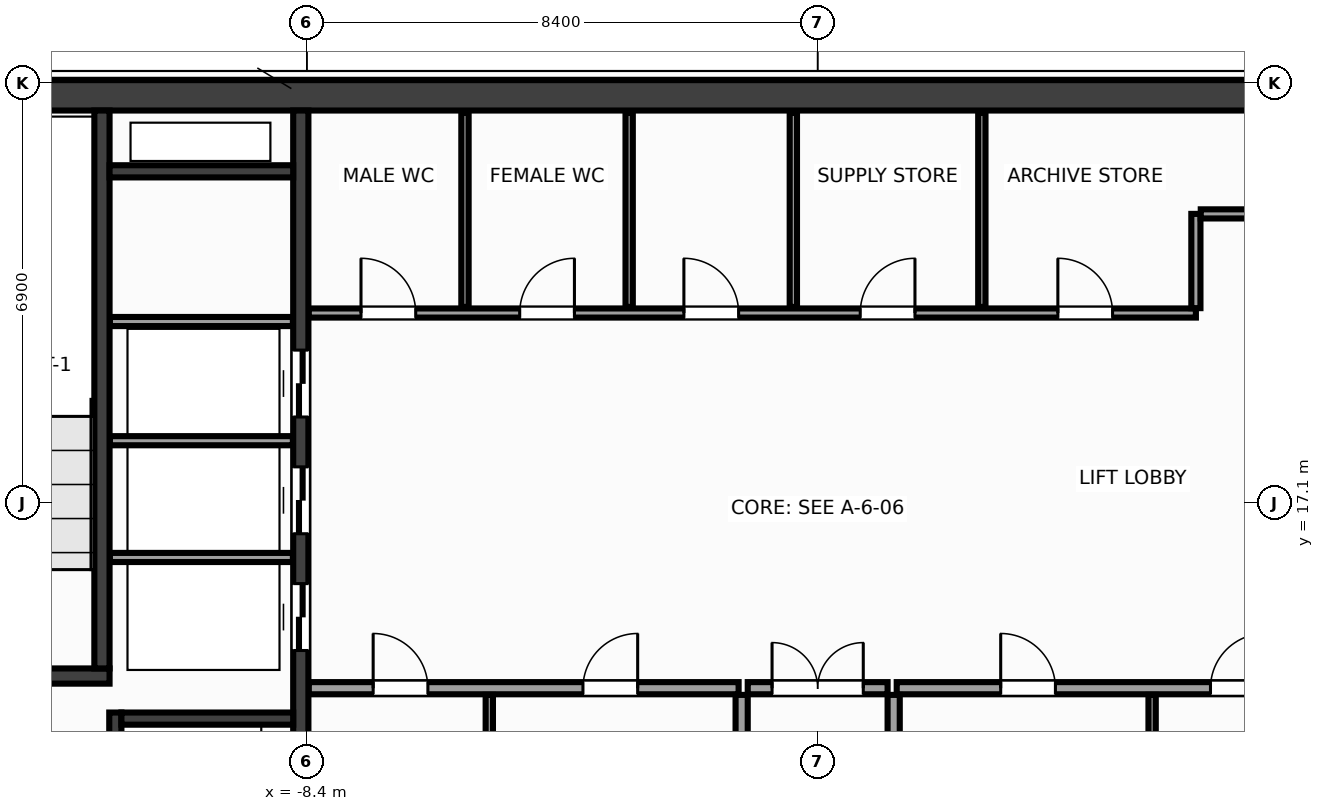
"""IFC4 building model, lengths in metres.
Left out: names, types, materials, properties, quantities, classifications, styles, units other than length and angle.
Written with IfcOpenShell. Run it as: python <this file> out.ifc"""

import sys

from ifc_helpers import new_model, si_unit, direction, frame, frame_2d, origin, place, context, subcontext, project, spatial, rectangle, extrude, source, transform, mapped, element, fill, save


model = new_model("IFC4")
c1 = context("Model", 3, precision=1e-05, world=origin(), true_north=direction((0.0, 1.0)))
c2 = subcontext(c1, "Body", "Model", "MODEL_VIEW")
j1 = project(units=[si_unit("LENGTHUNIT", "METRE"), si_unit("PLANEANGLEUNIT", "RADIAN")], contexts=[c1])
p1 = place(None, origin())
s1 = spatial("IfcSite", under=j1, at=p1, CompositionType="ELEMENT")
p2 = place(p1, origin())
s2 = spatial("IfcBuilding", under=s1, at=p2, CompositionType="ELEMENT")
p3 = place(p2, frame((0.0, 0.0, 257.6)))
s3 = spatial("IfcBuildingStorey", under=s2, at=p3, CompositionType="ELEMENT", Elevation=257.6)
m1 = source(origin(), c2, "Body", "SweptSolid", [
    extrude(rectangle(XDim=31.7, YDim=0.5, at=frame_2d((15.85, 0.0))), origin(), (0.0, 0.0, 1.0), 3.6),
])
p4 = place(p3, frame((-15.85, 23.8, 0.0), z_axis=(0.0, 0.0, 1.0), x_axis=(1.0, 0.0, 0.0)))
e1 = element("IfcWall", 1, at=p4, inside=s3, PredefinedType="SHEAR", context=c2, shape_type="MappedRepresentation", body=[
    mapped(m1, transform((0.0, 0.0, 0.0), x_axis=(1.0, 0.0, 0.0), y_axis=(0.0, 1.0, 0.0), z_axis=(0.0, 0.0, 1.0), scale=1.0)),
])
m2 = source(origin(), c2, "Body", "SweptSolid", [
    extrude(rectangle(XDim=13.1, YDim=0.25, at=frame_2d((6.55, 0.0))), origin(), (0.0, 0.0, 1.0), 3.6),
])
p5 = place(p3, frame((-8.5, 10.45, 0.0), z_axis=(0.0, 0.0, 1.0), x_axis=(0.0, 1.0, 0.0)))
e2 = element("IfcWall", 2, at=p5, inside=s3, PredefinedType="SHEAR", context=c2, shape_type="MappedRepresentation", body=[
    mapped(m2, transform((0.0, 0.0, 0.0), x_axis=(1.0, 0.0, 0.0), y_axis=(0.0, 1.0, 0.0), z_axis=(0.0, 0.0, 1.0), scale=1.0)),
])
p6 = place(p5, frame((4.22, 0.0, 0.0)))
e3 = element("IfcOpeningElement", 3, at=p6, cuts=e2, PredefinedType="OPENING", context=c2, shape_type="SweptSolid", body=[
    extrude(rectangle(XDim=1.1, YDim=2.15, at=frame_2d((0.55, 1.075))), frame((0.0, 0.137, 0.0), z_axis=(0.0, -1.0, 0.0), x_axis=(1.0, 0.0, 0.0)), (0.0, 0.0, 1.0), 0.274),
])
p7 = place(p5, frame((6.14, 0.0, 0.0)))
e4 = element("IfcOpeningElement", 4, at=p7, cuts=e2, PredefinedType="OPENING", context=c2, shape_type="SweptSolid", body=[
    extrude(rectangle(XDim=1.1, YDim=2.15, at=frame_2d((0.55, 1.075))), frame((0.0, 0.137, 0.0), z_axis=(0.0, -1.0, 0.0), x_axis=(1.0, 0.0, 0.0)), (0.0, 0.0, 1.0), 0.274),
])
p8 = place(p5, frame((8.06, 0.0, 0.0)))
e5 = element("IfcOpeningElement", 5, at=p8, cuts=e2, PredefinedType="OPENING", context=c2, shape_type="SweptSolid", body=[
    extrude(rectangle(XDim=1.1, YDim=2.15, at=frame_2d((0.55, 1.075))), frame((0.0, 0.137, 0.0), z_axis=(0.0, -1.0, 0.0), x_axis=(1.0, 0.0, 0.0)), (0.0, 0.0, 1.0), 0.274),
])
m3 = source(origin(), c2, "Body", "SweptSolid", [
    extrude(rectangle(XDim=3.705, YDim=0.25, at=frame_2d((1.853, 0.0))), origin(), (0.0, 0.0, 1.0), 3.6),
])
p9 = place(p3, frame((-15.35, 14.25, 0.0), z_axis=(0.0, 0.0, 1.0), x_axis=(1.0, 0.0, 0.0)))
e6 = element("IfcWall", 6, at=p9, inside=s3, PredefinedType="SHEAR", context=c2, shape_type="MappedRepresentation", body=[
    mapped(m3, transform((0.0, 0.0, 0.0), x_axis=(1.0, 0.0, 0.0), y_axis=(0.0, 1.0, 0.0), z_axis=(0.0, 0.0, 1.0), scale=1.0)),
])
p10 = place(p9, frame((0.95, 0.0, 0.0)))
e7 = element("IfcOpeningElement", 7, at=p10, cuts=e6, PredefinedType="OPENING", context=c2, shape_type="SweptSolid", body=[
    extrude(rectangle(XDim=1.6, YDim=2.15, at=frame_2d((0.8, 1.075))), frame((0.0, 0.137, 0.0), z_axis=(0.0, -1.0, 0.0), x_axis=(1.0, 0.0, 0.0)), (0.0, 0.0, 1.0), 0.274),
])
m4 = source(origin(), c2, "Body", "SweptSolid", [
    extrude(rectangle(XDim=9.175, YDim=0.25, at=frame_2d((4.587, 0.0))), origin(), (0.0, 0.0, 1.0), 3.6),
])
p11 = place(p3, frame((-11.77, 14.375, 0.0), z_axis=(0.0, 0.0, 1.0), x_axis=(0.0, 1.0, 0.0)))
e8 = element("IfcWall", 8, at=p11, inside=s3, PredefinedType="SHEAR", context=c2, shape_type="MappedRepresentation", body=[
    mapped(m4, transform((0.0, 0.0, 0.0), x_axis=(1.0, 0.0, 0.0), y_axis=(0.0, 1.0, 0.0), z_axis=(0.0, 0.0, 1.0), scale=1.0)),
])
m5 = source(origin(), c2, "Body", "SweptSolid", [
    extrude(rectangle(XDim=3.2, YDim=0.2, at=frame_2d((1.6, 0.0))), origin(), (0.0, 0.0, 1.0), 3.6),
])
p12 = place(p3, frame((-11.55, 10.45, 0.0), z_axis=(0.0, 0.0, 1.0), x_axis=(0.0, 1.0, 0.0)))
e9 = element("IfcWall", 9, at=p12, inside=s3, PredefinedType="SHEAR", context=c2, shape_type="MappedRepresentation", body=[
    mapped(m5, transform((0.0, 0.0, 0.0), x_axis=(1.0, 0.0, 0.0), y_axis=(0.0, 1.0, 0.0), z_axis=(0.0, 0.0, 1.0), scale=1.0)),
])
p13 = place(p12, frame((0.9, 0.0, 0.0)))
e10 = element("IfcOpeningElement", 10, at=p13, cuts=e9, PredefinedType="OPENING", context=c2, shape_type="SweptSolid", body=[
    extrude(rectangle(XDim=1.1, YDim=2.15, at=frame_2d((0.55, 1.075))), frame((0.0, 0.112, 0.0), z_axis=(0.0, -1.0, 0.0), x_axis=(1.0, 0.0, 0.0)), (0.0, 0.0, 1.0), 0.224),
])
m6 = source(origin(), c2, "Body", "SweptSolid", [
    extrude(rectangle(XDim=2.825, YDim=0.2, at=frame_2d((1.413, 0.0))), origin(), (0.0, 0.0, 1.0), 3.6),
])
p14 = place(p3, frame((-11.45, 13.55, 0.0), z_axis=(0.0, 0.0, 1.0), x_axis=(1.0, 0.0, 0.0)))
e11 = element("IfcWall", 11, at=p14, inside=s3, PredefinedType="SHEAR", context=c2, shape_type="MappedRepresentation", body=[
    mapped(m6, transform((0.0, 0.0, 0.0), x_axis=(1.0, 0.0, 0.0), y_axis=(0.0, 1.0, 0.0), z_axis=(0.0, 0.0, 1.0), scale=1.0)),
])
m7 = source(origin(), c2, "Body", "SweptSolid", [
    extrude(rectangle(XDim=3.02, YDim=0.2, at=frame_2d((1.51, 0.0))), origin(), (0.0, 0.0, 1.0), 3.6),
])
p15 = place(p3, frame((-11.645, 22.55, 0.0), z_axis=(0.0, 0.0, 1.0), x_axis=(1.0, 0.0, 0.0)))
e12 = element("IfcWall", 12, at=p15, inside=s3, PredefinedType="SHEAR", context=c2, shape_type="MappedRepresentation", body=[
    mapped(m7, transform((0.0, 0.0, 0.0), x_axis=(1.0, 0.0, 0.0), y_axis=(0.0, 1.0, 0.0), z_axis=(0.0, 0.0, 1.0), scale=1.0)),
])
m8 = source(origin(), c2, "Body", "SweptSolid", [
    extrude(rectangle(XDim=3.01, YDim=0.15, at=frame_2d((1.505, 0.0))), origin(), (0.0, 0.0, 1.0), 3.37),
])
for number, where, z_axis, x_axis in (
    (13, (-11.64, 16.2, 0.0), (0.0, 0.0, 1.0), (1.0, 0.0, 0.0)),
    (14, (-11.64, 18.12, 0.0), (0.0, 0.0, 1.0), (1.0, 0.0, 0.0)),
    (15, (-11.64, 20.08, 0.0), (0.0, 0.0, 1.0), (1.0, 0.0, 0.0)),
):
    element("IfcWall", number, at=place(p3, frame(where, z_axis=z_axis, x_axis=x_axis)), inside=s3, PredefinedType="PARTITIONING", context=c2, shape_type="MappedRepresentation", body=[
        mapped(m8, transform((0.0, 0.0, 0.0), x_axis=(1.0, 0.0, 0.0), y_axis=(0.0, 1.0, 0.0), z_axis=(0.0, 0.0, 1.0), scale=1.0)),
    ])
m9 = source(origin(), c2, "Body", "SweptSolid", [
    extrude(rectangle(XDim=7.07, YDim=0.2, at=frame_2d((3.535, 0.0))), origin(), (0.0, 0.0, 1.0), 3.37),
])
p16 = place(p3, frame((-8.37, 14.05, 0.0), z_axis=(0.0, 0.0, 1.0), x_axis=(1.0, 0.0, 0.0)))
e16 = element("IfcWall", 16, at=p16, inside=s3, PredefinedType="PARTITIONING", context=c2, shape_type="MappedRepresentation", body=[
    mapped(m9, transform((0.0, 0.0, 0.0), x_axis=(1.0, 0.0, 0.0), y_axis=(0.0, 1.0, 0.0), z_axis=(0.0, 0.0, 1.0), scale=1.0)),
])
p17 = place(p16, frame((1.06, 0.0, 0.0)))
e17 = element("IfcOpeningElement", 17, at=p17, cuts=e16, PredefinedType="OPENING", context=c2, shape_type="SweptSolid", body=[
    extrude(rectangle(XDim=0.9, YDim=2.15, at=frame_2d((0.45, 1.075))), frame((0.0, 0.112, 0.0), z_axis=(0.0, -1.0, 0.0), x_axis=(1.0, 0.0, 0.0)), (0.0, 0.0, 1.0), 0.224),
])
p18 = place(p16, frame((4.51, 0.0, 0.0)))
e18 = element("IfcOpeningElement", 18, at=p18, cuts=e16, PredefinedType="OPENING", context=c2, shape_type="SweptSolid", body=[
    extrude(rectangle(XDim=0.9, YDim=2.15, at=frame_2d((0.45, 1.075))), frame((0.0, 0.112, 0.0), z_axis=(0.0, -1.0, 0.0), x_axis=(1.0, 0.0, 0.0)), (0.0, 0.0, 1.0), 0.224),
])
p19 = place(p3, frame((1.3, 14.05, 0.0), z_axis=(0.0, 0.0, 1.0), x_axis=(1.0, 0.0, 0.0)))
e19 = element("IfcWall", 19, at=p19, inside=s3, PredefinedType="PARTITIONING", context=c2, shape_type="MappedRepresentation", body=[
    mapped(m9, transform((0.0, 0.0, 0.0), x_axis=(1.0, 0.0, 0.0), y_axis=(0.0, 1.0, 0.0), z_axis=(0.0, 0.0, 1.0), scale=1.0)),
])
p20 = place(p19, frame((1.71, 0.0, 0.0)))
e20 = element("IfcOpeningElement", 20, at=p20, cuts=e19, PredefinedType="OPENING", context=c2, shape_type="SweptSolid", body=[
    extrude(rectangle(XDim=0.9, YDim=2.15, at=frame_2d((0.45, 1.075))), frame((0.0, 0.112, 0.0), z_axis=(0.0, -1.0, 0.0), x_axis=(1.0, 0.0, 0.0)), (0.0, 0.0, 1.0), 0.224),
])
p21 = place(p19, frame((5.16, 0.0, 0.0)))
e21 = element("IfcOpeningElement", 21, at=p21, cuts=e19, PredefinedType="OPENING", context=c2, shape_type="SweptSolid", body=[
    extrude(rectangle(XDim=0.9, YDim=2.15, at=frame_2d((0.45, 1.075))), frame((0.0, 0.112, 0.0), z_axis=(0.0, -1.0, 0.0), x_axis=(1.0, 0.0, 0.0)), (0.0, 0.0, 1.0), 0.224),
])
m10 = source(origin(), c2, "Body", "SweptSolid", [
    extrude(rectangle(XDim=3.49, YDim=0.2, at=frame_2d((1.745, 0.0))), origin(), (0.0, 0.0, 1.0), 3.37),
])
for number, where, z_axis, x_axis in (
    (22, (-1.25, 10.45, 0.0), (0.0, 0.0, 1.0), (0.0, 1.0, 0.0)),
    (23, (1.25, 10.45, 0.0), (0.0, 0.0, 1.0), (0.0, 1.0, 0.0)),
):
    element("IfcWall", number, at=place(p3, frame(where, z_axis=z_axis, x_axis=x_axis)), inside=s3, PredefinedType="PARTITIONING", context=c2, shape_type="MappedRepresentation", body=[
        mapped(m10, transform((0.0, 0.0, 0.0), x_axis=(1.0, 0.0, 0.0), y_axis=(0.0, 1.0, 0.0), z_axis=(0.0, 0.0, 1.0), scale=1.0)),
    ])
m11 = source(origin(), c2, "Body", "SweptSolid", [
    extrude(rectangle(XDim=2.3, YDim=0.2, at=frame_2d((1.15, 0.0))), origin(), (0.0, 0.0, 1.0), 3.37),
])
p22 = place(p3, frame((-1.15, 14.05, 0.0), z_axis=(0.0, 0.0, 1.0), x_axis=(1.0, 0.0, 0.0)))
e24 = element("IfcWall", 24, at=p22, inside=s3, PredefinedType="PARTITIONING", context=c2, shape_type="MappedRepresentation", body=[
    mapped(m11, transform((0.0, 0.0, 0.0), x_axis=(1.0, 0.0, 0.0), y_axis=(0.0, 1.0, 0.0), z_axis=(0.0, 0.0, 1.0), scale=1.0)),
])
p23 = place(p22, frame((0.4, 0.0, 0.0)))
e25 = element("IfcOpeningElement", 25, at=p23, cuts=e24, PredefinedType="OPENING", context=c2, shape_type="SweptSolid", body=[
    extrude(rectangle(XDim=1.5, YDim=2.2, at=frame_2d((0.75, 1.1))), frame((0.0, 0.112, 0.0), z_axis=(0.0, -1.0, 0.0), x_axis=(1.0, 0.0, 0.0)), (0.0, 0.0, 1.0), 0.224),
])
m12 = source(origin(), c2, "Body", "SweptSolid", [
    extrude(rectangle(XDim=14.59, YDim=0.15, at=frame_2d((7.295, 0.0))), origin(), (0.0, 0.0, 1.0), 3.37),
])
p24 = place(p3, frame((-8.37, 20.22, 0.0), z_axis=(0.0, 0.0, 1.0), x_axis=(1.0, 0.0, 0.0)))
e26 = element("IfcWall", 26, at=p24, inside=s3, PredefinedType="PARTITIONING", context=c2, shape_type="MappedRepresentation", body=[
    mapped(m12, transform((0.0, 0.0, 0.0), x_axis=(1.0, 0.0, 0.0), y_axis=(0.0, 1.0, 0.0), z_axis=(0.0, 0.0, 1.0), scale=1.0)),
])
p25 = place(p24, frame((0.86, 0.0, 0.0)))
e27 = element("IfcOpeningElement", 27, at=p25, cuts=e26, PredefinedType="OPENING", context=c2, shape_type="SweptSolid", body=[
    extrude(rectangle(XDim=0.9, YDim=2.15, at=frame_2d((0.45, 1.075))), frame((0.0, 0.087, 0.0), z_axis=(0.0, -1.0, 0.0), x_axis=(1.0, 0.0, 0.0)), (0.0, 0.0, 1.0), 0.174),
])
p26 = place(p24, frame((3.47, 0.0, 0.0)))
e28 = element("IfcOpeningElement", 28, at=p26, cuts=e26, PredefinedType="OPENING", context=c2, shape_type="SweptSolid", body=[
    extrude(rectangle(XDim=0.9, YDim=2.15, at=frame_2d((0.45, 1.075))), frame((0.0, 0.087, 0.0), z_axis=(0.0, -1.0, 0.0), x_axis=(1.0, 0.0, 0.0)), (0.0, 0.0, 1.0), 0.174),
])
p27 = place(p24, frame((6.17, 0.0, 0.0)))
e29 = element("IfcOpeningElement", 29, at=p27, cuts=e26, PredefinedType="OPENING", context=c2, shape_type="SweptSolid", body=[
    extrude(rectangle(XDim=0.9, YDim=2.15, at=frame_2d((0.45, 1.075))), frame((0.0, 0.087, 0.0), z_axis=(0.0, -1.0, 0.0), x_axis=(1.0, 0.0, 0.0)), (0.0, 0.0, 1.0), 0.174),
])
p28 = place(p24, frame((9.07, 0.0, 0.0)))
e30 = element("IfcOpeningElement", 30, at=p28, cuts=e26, PredefinedType="OPENING", context=c2, shape_type="SweptSolid", body=[
    extrude(rectangle(XDim=0.9, YDim=2.15, at=frame_2d((0.45, 1.075))), frame((0.0, 0.087, 0.0), z_axis=(0.0, -1.0, 0.0), x_axis=(1.0, 0.0, 0.0)), (0.0, 0.0, 1.0), 0.174),
])
p29 = place(p24, frame((12.32, 0.0, 0.0)))
e31 = element("IfcOpeningElement", 31, at=p29, cuts=e26, PredefinedType="OPENING", context=c2, shape_type="SweptSolid", body=[
    extrude(rectangle(XDim=0.9, YDim=2.15, at=frame_2d((0.45, 1.075))), frame((0.0, 0.087, 0.0), z_axis=(0.0, -1.0, 0.0), x_axis=(1.0, 0.0, 0.0)), (0.0, 0.0, 1.0), 0.174),
])
m13 = source(origin(), c2, "Body", "SweptSolid", [
    extrude(rectangle(XDim=1.55, YDim=0.15, at=frame_2d((0.775, 0.0))), origin(), (0.0, 0.0, 1.0), 3.37),
])
p30 = place(p3, frame((6.22, 20.3, 0.0), z_axis=(0.0, 0.0, 1.0), x_axis=(0.0, 1.0, 0.0)))
e32 = element("IfcWall", 32, at=p30, inside=s3, PredefinedType="PARTITIONING", context=c2, shape_type="MappedRepresentation", body=[
    mapped(m13, transform((0.0, 0.0, 0.0), x_axis=(1.0, 0.0, 0.0), y_axis=(0.0, 1.0, 0.0), z_axis=(0.0, 0.0, 1.0), scale=1.0)),
])
m14 = source(origin(), c2, "Body", "SweptSolid", [
    extrude(rectangle(XDim=2.07, YDim=0.15, at=frame_2d((1.035, 0.0))), origin(), (0.0, 0.0, 1.0), 3.37),
])
p31 = place(p3, frame((6.3, 21.85, 0.0), z_axis=(0.0, 0.0, 1.0), x_axis=(1.0, 0.0, 0.0)))
e33 = element("IfcWall", 33, at=p31, inside=s3, PredefinedType="PARTITIONING", context=c2, shape_type="MappedRepresentation", body=[
    mapped(m14, transform((0.0, 0.0, 0.0), x_axis=(1.0, 0.0, 0.0), y_axis=(0.0, 1.0, 0.0), z_axis=(0.0, 0.0, 1.0), scale=1.0)),
])
m15 = source(origin(), c2, "Body", "SweptSolid", [
    extrude(rectangle(XDim=3.49, YDim=0.12, at=frame_2d((1.745, 0.0))), origin(), (0.0, 0.0, 1.0), 3.37),
])
for number, where, z_axis, x_axis in (
    (34, (-5.4, 10.45, 0.0), (0.0, 0.0, 1.0), (0.0, 1.0, 0.0)),
    (35, (5.5, 10.45, 0.0), (0.0, 0.0, 1.0), (0.0, 1.0, 0.0)),
):
    element("IfcWall", number, at=place(p3, frame(where, z_axis=z_axis, x_axis=x_axis)), inside=s3, PredefinedType="PARTITIONING", context=c2, shape_type="MappedRepresentation", body=[
        mapped(m15, transform((0.0, 0.0, 0.0), x_axis=(1.0, 0.0, 0.0), y_axis=(0.0, 1.0, 0.0), z_axis=(0.0, 0.0, 1.0), scale=1.0)),
    ])
m16 = source(origin(), c2, "Body", "SweptSolid", [
    extrude(rectangle(XDim=3.19, YDim=0.12, at=frame_2d((1.595, 0.0))), origin(), (0.0, 0.0, 1.0), 3.37),
])
for number, where, z_axis, x_axis in (
    (36, (-5.8, 20.32, 0.0), (0.0, 0.0, 1.0), (0.0, 1.0, 0.0)),
    (37, (-3.1, 20.32, 0.0), (0.0, 0.0, 1.0), (0.0, 1.0, 0.0)),
    (38, (-0.4, 20.32, 0.0), (0.0, 0.0, 1.0), (0.0, 1.0, 0.0)),
    (39, (2.7, 20.32, 0.0), (0.0, 0.0, 1.0), (0.0, 1.0, 0.0)),
):
    element("IfcWall", number, at=place(p3, frame(where, z_axis=z_axis, x_axis=x_axis)), inside=s3, PredefinedType="PARTITIONING", context=c2, shape_type="MappedRepresentation", body=[
        mapped(m16, transform((0.0, 0.0, 0.0), x_axis=(1.0, 0.0, 0.0), y_axis=(0.0, 1.0, 0.0), z_axis=(0.0, 0.0, 1.0), scale=1.0)),
    ])
m17 = source(origin(), c2, "Body", "SweptSolid", [
    extrude(rectangle(XDim=1.1, YDim=2.15, at=frame_2d((0.55, 1.075))), frame((0.0, 0.025, 0.0), z_axis=(0.0, -1.0, 0.0), x_axis=(1.0, 0.0, 0.0)), (0.0, 0.0, 1.0), 0.05),
])
p32 = place(p6, origin())
e40 = element("IfcDoor", 40, at=p32, inside=s3, OperationType="DOUBLE_DOOR_SLIDING", PredefinedType="DOOR", context=c2, shape_type="MappedRepresentation", body=[
    mapped(m17, transform((0.0, 0.0, 0.0), x_axis=(1.0, 0.0, 0.0), y_axis=(0.0, 1.0, 0.0), z_axis=(0.0, 0.0, 1.0), scale=1.0)),
])
fill(e3, e40)
p33 = place(p7, origin())
e41 = element("IfcDoor", 41, at=p33, inside=s3, OperationType="DOUBLE_DOOR_SLIDING", PredefinedType="DOOR", context=c2, shape_type="MappedRepresentation", body=[
    mapped(m17, transform((0.0, 0.0, 0.0), x_axis=(1.0, 0.0, 0.0), y_axis=(0.0, 1.0, 0.0), z_axis=(0.0, 0.0, 1.0), scale=1.0)),
])
fill(e4, e41)
p34 = place(p8, origin())
e42 = element("IfcDoor", 42, at=p34, inside=s3, OperationType="DOUBLE_DOOR_SLIDING", PredefinedType="DOOR", context=c2, shape_type="MappedRepresentation", body=[
    mapped(m17, transform((0.0, 0.0, 0.0), x_axis=(1.0, 0.0, 0.0), y_axis=(0.0, 1.0, 0.0), z_axis=(0.0, 0.0, 1.0), scale=1.0)),
])
fill(e5, e42)
m18 = source(origin(), c2, "Body", "SweptSolid", [
    extrude(rectangle(XDim=0.9, YDim=2.15, at=frame_2d((0.45, 1.075))), frame((0.0, 0.025, 0.0), z_axis=(0.0, -1.0, 0.0), x_axis=(1.0, 0.0, 0.0)), (0.0, 0.0, 1.0), 0.05),
])
p35 = place(p17, origin())
e43 = element("IfcDoor", 43, at=p35, inside=s3, OperationType="SINGLE_SWING_LEFT", PredefinedType="DOOR", context=c2, shape_type="MappedRepresentation", body=[
    mapped(m18, transform((0.0, 0.0, 0.0), x_axis=(1.0, 0.0, 0.0), y_axis=(0.0, 1.0, 0.0), z_axis=(0.0, 0.0, 1.0), scale=1.0)),
])
fill(e17, e43)
p36 = place(p18, origin())
e44 = element("IfcDoor", 44, at=p36, inside=s3, OperationType="SINGLE_SWING_RIGHT", PredefinedType="DOOR", context=c2, shape_type="MappedRepresentation", body=[
    mapped(m18, transform((0.0, 0.0, 0.0), x_axis=(1.0, 0.0, 0.0), y_axis=(0.0, 1.0, 0.0), z_axis=(0.0, 0.0, 1.0), scale=1.0)),
])
fill(e18, e44)
p37 = place(p20, origin())
e45 = element("IfcDoor", 45, at=p37, inside=s3, OperationType="SINGLE_SWING_LEFT", PredefinedType="DOOR", context=c2, shape_type="MappedRepresentation", body=[
    mapped(m18, transform((0.0, 0.0, 0.0), x_axis=(1.0, 0.0, 0.0), y_axis=(0.0, 1.0, 0.0), z_axis=(0.0, 0.0, 1.0), scale=1.0)),
])
fill(e20, e45)
p38 = place(p21, origin())
e46 = element("IfcDoor", 46, at=p38, inside=s3, OperationType="SINGLE_SWING_RIGHT", PredefinedType="DOOR", context=c2, shape_type="MappedRepresentation", body=[
    mapped(m18, transform((0.0, 0.0, 0.0), x_axis=(1.0, 0.0, 0.0), y_axis=(0.0, 1.0, 0.0), z_axis=(0.0, 0.0, 1.0), scale=1.0)),
])
fill(e21, e46)
m19 = source(origin(), c2, "Body", "SweptSolid", [
    extrude(rectangle(XDim=1.5, YDim=2.2, at=frame_2d((0.75, 1.1))), frame((0.0, 0.025, 0.0), z_axis=(0.0, -1.0, 0.0), x_axis=(1.0, 0.0, 0.0)), (0.0, 0.0, 1.0), 0.05),
])
p39 = place(p23, origin())
e47 = element("IfcDoor", 47, at=p39, inside=s3, OperationType="DOUBLE_DOOR_SINGLE_SWING", PredefinedType="DOOR", context=c2, shape_type="MappedRepresentation", body=[
    mapped(m19, transform((0.0, 0.0, 0.0), x_axis=(1.0, 0.0, 0.0), y_axis=(0.0, 1.0, 0.0), z_axis=(0.0, 0.0, 1.0), scale=1.0)),
])
fill(e25, e47)
p40 = place(p25, origin())
e48 = element("IfcDoor", 48, at=p40, inside=s3, OperationType="SINGLE_SWING_LEFT", PredefinedType="DOOR", context=c2, shape_type="MappedRepresentation", body=[
    mapped(m18, transform((0.0, 0.0, 0.0), x_axis=(1.0, 0.0, 0.0), y_axis=(0.0, 1.0, 0.0), z_axis=(0.0, 0.0, 1.0), scale=1.0)),
])
fill(e27, e48)
p41 = place(p26, origin())
e49 = element("IfcDoor", 49, at=p41, inside=s3, OperationType="SINGLE_SWING_RIGHT", PredefinedType="DOOR", context=c2, shape_type="MappedRepresentation", body=[
    mapped(m18, transform((0.0, 0.0, 0.0), x_axis=(1.0, 0.0, 0.0), y_axis=(0.0, 1.0, 0.0), z_axis=(0.0, 0.0, 1.0), scale=1.0)),
])
fill(e28, e49)
p42 = place(p27, origin())
e50 = element("IfcDoor", 50, at=p42, inside=s3, OperationType="SINGLE_SWING_LEFT", PredefinedType="DOOR", context=c2, shape_type="MappedRepresentation", body=[
    mapped(m18, transform((0.0, 0.0, 0.0), x_axis=(1.0, 0.0, 0.0), y_axis=(0.0, 1.0, 0.0), z_axis=(0.0, 0.0, 1.0), scale=1.0)),
])
fill(e29, e50)
p43 = place(p28, origin())
e51 = element("IfcDoor", 51, at=p43, inside=s3, OperationType="SINGLE_SWING_RIGHT", PredefinedType="DOOR", context=c2, shape_type="MappedRepresentation", body=[
    mapped(m18, transform((0.0, 0.0, 0.0), x_axis=(1.0, 0.0, 0.0), y_axis=(0.0, 1.0, 0.0), z_axis=(0.0, 0.0, 1.0), scale=1.0)),
])
fill(e30, e51)
p44 = place(p29, origin())
e52 = element("IfcDoor", 52, at=p44, inside=s3, OperationType="SINGLE_SWING_LEFT", PredefinedType="DOOR", context=c2, shape_type="MappedRepresentation", body=[
    mapped(m18, transform((0.0, 0.0, 0.0), x_axis=(1.0, 0.0, 0.0), y_axis=(0.0, 1.0, 0.0), z_axis=(0.0, 0.0, 1.0), scale=1.0)),
])
fill(e31, e52)
save(model, sys.argv[1])
